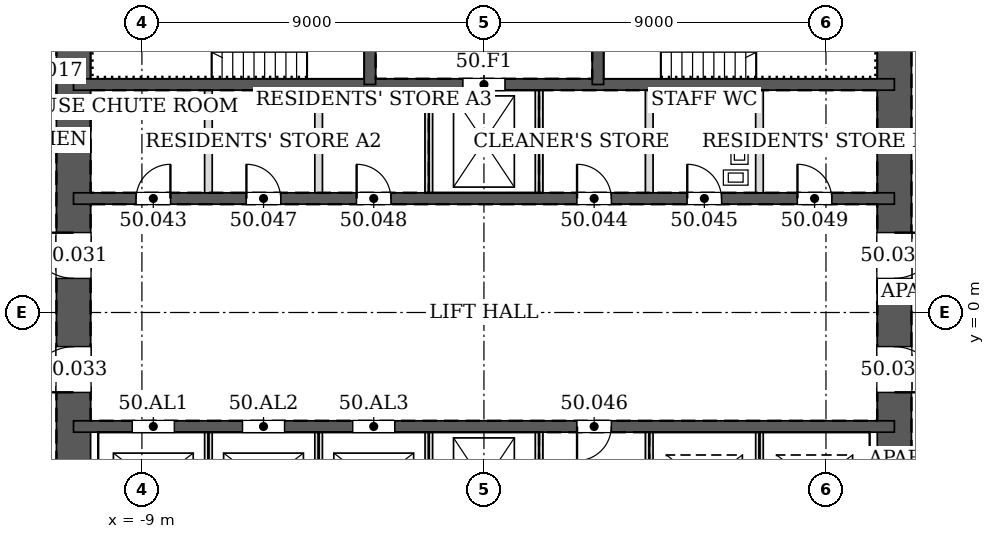
"""IFC4 building model, lengths in metres.
Left out: names, types, materials, properties, quantities, classifications, styles, units other than length and angle.
Written with IfcOpenShell. Run it as: python <this file> out.ifc"""

import sys

from ifc_helpers import new_model, si_unit, direction, frame, frame_2d, origin, place, context, subcontext, project, spatial, rectangle, extrude, element, fill, save


model = new_model("IFC4")
c1 = context("Model", 3, precision=1e-05, world=origin(), true_north=direction((0.0, 1.0)))
c2 = subcontext(c1, "Body", "Model", "MODEL_VIEW")
j1 = project(units=[si_unit("LENGTHUNIT", "METRE"), si_unit("PLANEANGLEUNIT", "RADIAN")], contexts=[c1])
p1 = place(None, origin())
s1 = spatial("IfcSite", under=j1, at=p1, CompositionType="ELEMENT")
p2 = place(p1, origin())
s2 = spatial("IfcBuilding", under=s1, at=p2, CompositionType="ELEMENT")
p3 = place(p2, frame((0.0, 0.0, 217.6)))
s3 = spatial("IfcBuildingStorey", under=s2, at=p3, CompositionType="ELEMENT", Elevation=217.6)
p4 = place(p3, frame((10.8, -10.8, 0.0), z_axis=(0.0, 0.0, 1.0), x_axis=(0.0, 1.0, 0.0)))
e1 = element("IfcWall", 1, at=p4, inside=s3, PredefinedType="SOLIDWALL", context=c2, shape_type="SweptSolid", body=[
    extrude(rectangle(XDim=21.6, YDim=0.9, at=frame_2d((10.8, 0.0))), origin(), (0.0, 0.0, 1.0), 3.4),
])
p5 = place(p4, frame((11.7, 0.0, 0.0)))
e2 = element("IfcOpeningElement", 2, at=p5, cuts=e1, PredefinedType="OPENING", context=c2, shape_type="SweptSolid", body=[
    extrude(rectangle(XDim=1.2, YDim=2.1, at=frame_2d((0.6, 1.05))), frame((0.0, 0.46, 0.0), z_axis=(0.0, -1.0, 0.0), x_axis=(1.0, 0.0, 0.0)), (0.0, 0.0, 1.0), 0.92),
])
p6 = place(p4, frame((8.7, 0.0, 0.0)))
e3 = element("IfcOpeningElement", 3, at=p6, cuts=e1, PredefinedType="OPENING", context=c2, shape_type="SweptSolid", body=[
    extrude(rectangle(XDim=1.2, YDim=2.1, at=frame_2d((0.6, 1.05))), frame((0.0, 0.46, 0.0), z_axis=(0.0, -1.0, 0.0), x_axis=(1.0, 0.0, 0.0)), (0.0, 0.0, 1.0), 0.92),
])
p7 = place(p3, frame((-10.8, 10.8, 0.0), z_axis=(0.0, 0.0, 1.0), x_axis=(0.0, -1.0, 0.0)))
e4 = element("IfcWall", 4, at=p7, inside=s3, PredefinedType="SOLIDWALL", context=c2, shape_type="SweptSolid", body=[
    extrude(rectangle(XDim=21.6, YDim=0.9, at=frame_2d((10.8, 0.0))), origin(), (0.0, 0.0, 1.0), 3.4),
])
p8 = place(p7, frame((8.7, 0.0, 0.0)))
e5 = element("IfcOpeningElement", 5, at=p8, cuts=e4, PredefinedType="OPENING", context=c2, shape_type="SweptSolid", body=[
    extrude(rectangle(XDim=1.2, YDim=2.1, at=frame_2d((0.6, 1.05))), frame((0.0, 0.46, 0.0), z_axis=(0.0, -1.0, 0.0), x_axis=(1.0, 0.0, 0.0)), (0.0, 0.0, 1.0), 0.92),
])
p9 = place(p7, frame((11.7, 0.0, 0.0)))
e6 = element("IfcOpeningElement", 6, at=p9, cuts=e4, PredefinedType="OPENING", context=c2, shape_type="SweptSolid", body=[
    extrude(rectangle(XDim=1.2, YDim=2.1, at=frame_2d((0.6, 1.05))), frame((0.0, 0.46, 0.0), z_axis=(0.0, -1.0, 0.0), x_axis=(1.0, 0.0, 0.0)), (0.0, 0.0, 1.0), 0.92),
])
p10 = place(p3, frame((-10.8, 3.0, 0.0), z_axis=(0.0, 0.0, 1.0), x_axis=(1.0, 0.0, 0.0)))
e7 = element("IfcWall", 7, at=p10, inside=s3, PredefinedType="SOLIDWALL", context=c2, shape_type="SweptSolid", body=[
    extrude(rectangle(XDim=21.6, YDim=0.3, at=frame_2d((10.8, 0.0))), origin(), (0.0, 0.0, 1.0), 3.4),
])
p11 = place(p10, frame((1.65, 0.0, 0.0)))
e8 = element("IfcOpeningElement", 8, at=p11, cuts=e7, PredefinedType="OPENING", context=c2, shape_type="SweptSolid", body=[
    extrude(rectangle(XDim=0.9, YDim=2.1, at=frame_2d((0.45, 1.05))), frame((0.0, 0.16, 0.0), z_axis=(0.0, -1.0, 0.0), x_axis=(1.0, 0.0, 0.0)), (0.0, 0.0, 1.0), 0.32),
])
p12 = place(p10, frame((13.25, 0.0, 0.0)))
e9 = element("IfcOpeningElement", 9, at=p12, cuts=e7, PredefinedType="OPENING", context=c2, shape_type="SweptSolid", body=[
    extrude(rectangle(XDim=0.9, YDim=2.1, at=frame_2d((0.45, 1.05))), frame((0.0, 0.16, 0.0), z_axis=(0.0, -1.0, 0.0), x_axis=(1.0, 0.0, 0.0)), (0.0, 0.0, 1.0), 0.32),
])
p13 = place(p10, frame((16.15, 0.0, 0.0)))
e10 = element("IfcOpeningElement", 10, at=p13, cuts=e7, PredefinedType="OPENING", context=c2, shape_type="SweptSolid", body=[
    extrude(rectangle(XDim=0.9, YDim=2.1, at=frame_2d((0.45, 1.05))), frame((0.0, 0.16, 0.0), z_axis=(0.0, -1.0, 0.0), x_axis=(1.0, 0.0, 0.0)), (0.0, 0.0, 1.0), 0.32),
])
p14 = place(p10, frame((4.55, 0.0, 0.0)))
e11 = element("IfcOpeningElement", 11, at=p14, cuts=e7, PredefinedType="OPENING", context=c2, shape_type="SweptSolid", body=[
    extrude(rectangle(XDim=0.9, YDim=2.1, at=frame_2d((0.45, 1.05))), frame((0.0, 0.16, 0.0), z_axis=(0.0, -1.0, 0.0), x_axis=(1.0, 0.0, 0.0)), (0.0, 0.0, 1.0), 0.32),
])
p15 = place(p10, frame((7.45, 0.0, 0.0)))
e12 = element("IfcOpeningElement", 12, at=p15, cuts=e7, PredefinedType="OPENING", context=c2, shape_type="SweptSolid", body=[
    extrude(rectangle(XDim=0.9, YDim=2.1, at=frame_2d((0.45, 1.05))), frame((0.0, 0.16, 0.0), z_axis=(0.0, -1.0, 0.0), x_axis=(1.0, 0.0, 0.0)), (0.0, 0.0, 1.0), 0.32),
])
p16 = place(p10, frame((19.05, 0.0, 0.0)))
e13 = element("IfcOpeningElement", 13, at=p16, cuts=e7, PredefinedType="OPENING", context=c2, shape_type="SweptSolid", body=[
    extrude(rectangle(XDim=0.9, YDim=2.1, at=frame_2d((0.45, 1.05))), frame((0.0, 0.16, 0.0), z_axis=(0.0, -1.0, 0.0), x_axis=(1.0, 0.0, 0.0)), (0.0, 0.0, 1.0), 0.32),
])
p17 = place(p3, frame((-10.8, 6.0, 0.0), z_axis=(0.0, 0.0, 1.0), x_axis=(1.0, 0.0, 0.0)))
e14 = element("IfcWall", 14, at=p17, inside=s3, PredefinedType="SOLIDWALL", context=c2, shape_type="SweptSolid", body=[
    extrude(rectangle(XDim=21.6, YDim=0.3, at=frame_2d((10.8, 0.0))), origin(), (0.0, 0.0, 1.0), 3.4),
])
p18 = place(p17, frame((10.25, 0.0, 0.0)))
e15 = element("IfcOpeningElement", 15, at=p18, cuts=e14, PredefinedType="OPENING", context=c2, shape_type="SweptSolid", body=[
    extrude(rectangle(XDim=1.1, YDim=2.1, at=frame_2d((0.55, 1.05))), frame((0.0, 0.16, 0.0), z_axis=(0.0, -1.0, 0.0), x_axis=(1.0, 0.0, 0.0)), (0.0, 0.0, 1.0), 0.32),
])
p19 = place(p3, frame((-3.0, 6.0, 0.0), z_axis=(0.0, 0.0, 1.0), x_axis=(0.0, 1.0, 0.0)))
e16 = element("IfcWall", 16, at=p19, inside=s3, PredefinedType="SOLIDWALL", context=c2, shape_type="SweptSolid", body=[
    extrude(rectangle(XDim=4.8, YDim=0.3, at=frame_2d((2.4, 0.0))), origin(), (0.0, 0.0, 1.0), 3.4),
])
p20 = place(p19, frame((1.75, 0.0, 0.0)))
e17 = element("IfcOpeningElement", 17, at=p20, cuts=e16, PredefinedType="OPENING", context=c2, shape_type="SweptSolid", body=[
    extrude(rectangle(XDim=1.0, YDim=2.1, at=frame_2d((0.5, 1.05))), frame((0.0, 0.16, 0.0), z_axis=(0.0, -1.0, 0.0), x_axis=(1.0, 0.0, 0.0)), (0.0, 0.0, 1.0), 0.32),
])
p21 = place(p3, frame((3.0, 6.0, 0.0), z_axis=(0.0, 0.0, 1.0), x_axis=(0.0, 1.0, 0.0)))
e18 = element("IfcWall", 18, at=p21, inside=s3, PredefinedType="SOLIDWALL", context=c2, shape_type="SweptSolid", body=[
    extrude(rectangle(XDim=4.8, YDim=0.3, at=frame_2d((2.4, 0.0))), origin(), (0.0, 0.0, 1.0), 3.4),
])
p22 = place(p21, frame((1.75, 0.0, 0.0)))
e19 = element("IfcOpeningElement", 19, at=p22, cuts=e18, PredefinedType="OPENING", context=c2, shape_type="SweptSolid", body=[
    extrude(rectangle(XDim=1.0, YDim=2.1, at=frame_2d((0.5, 1.05))), frame((0.0, 0.16, 0.0), z_axis=(0.0, -1.0, 0.0), x_axis=(1.0, 0.0, 0.0)), (0.0, 0.0, 1.0), 0.32),
])
p23 = place(p3, frame((-10.8, -3.0, 0.0), z_axis=(0.0, 0.0, 1.0), x_axis=(1.0, 0.0, 0.0)))
e20 = element("IfcWall", 20, at=p23, inside=s3, PredefinedType="SOLIDWALL", context=c2, shape_type="SweptSolid", body=[
    extrude(rectangle(XDim=21.6, YDim=0.3, at=frame_2d((10.8, 0.0))), origin(), (0.0, 0.0, 1.0), 3.4),
])
p24 = place(p23, frame((13.25, 0.0, 0.0)))
e21 = element("IfcOpeningElement", 21, at=p24, cuts=e20, PredefinedType="OPENING", context=c2, shape_type="SweptSolid", body=[
    extrude(rectangle(XDim=0.9, YDim=2.1, at=frame_2d((0.45, 1.05))), frame((0.0, 0.16, 0.0), z_axis=(0.0, -1.0, 0.0), x_axis=(1.0, 0.0, 0.0)), (0.0, 0.0, 1.0), 0.32),
])
p25 = place(p23, frame((1.55, 0.0, 0.0)))
e22 = element("IfcOpeningElement", 22, at=p25, cuts=e20, PredefinedType="OPENING", context=c2, shape_type="SweptSolid", body=[
    extrude(rectangle(XDim=1.1, YDim=2.1, at=frame_2d((0.55, 1.05))), frame((0.0, 0.16, 0.0), z_axis=(0.0, -1.0, 0.0), x_axis=(1.0, 0.0, 0.0)), (0.0, 0.0, 1.0), 0.32),
])
p26 = place(p23, frame((4.45, 0.0, 0.0)))
e23 = element("IfcOpeningElement", 23, at=p26, cuts=e20, PredefinedType="OPENING", context=c2, shape_type="SweptSolid", body=[
    extrude(rectangle(XDim=1.1, YDim=2.1, at=frame_2d((0.55, 1.05))), frame((0.0, 0.16, 0.0), z_axis=(0.0, -1.0, 0.0), x_axis=(1.0, 0.0, 0.0)), (0.0, 0.0, 1.0), 0.32),
])
p27 = place(p23, frame((7.35, 0.0, 0.0)))
e24 = element("IfcOpeningElement", 24, at=p27, cuts=e20, PredefinedType="OPENING", context=c2, shape_type="SweptSolid", body=[
    extrude(rectangle(XDim=1.1, YDim=2.1, at=frame_2d((0.55, 1.05))), frame((0.0, 0.16, 0.0), z_axis=(0.0, -1.0, 0.0), x_axis=(1.0, 0.0, 0.0)), (0.0, 0.0, 1.0), 0.32),
])
for number, where, z_axis, x_axis in (
    (25, (-7.25, 3.15, 0.0), (0.0, 0.0, 1.0), (0.0, 1.0, 0.0)),
    (26, (-4.35, 3.15, 0.0), (0.0, 0.0, 1.0), (0.0, 1.0, 0.0)),
    (27, (-1.45, 3.15, 0.0), (0.0, 0.0, 1.0), (0.0, 1.0, 0.0)),
    (28, (1.45, 3.15, 0.0), (0.0, 0.0, 1.0), (0.0, 1.0, 0.0)),
    (29, (4.35, 3.15, 0.0), (0.0, 0.0, 1.0), (0.0, 1.0, 0.0)),
    (30, (7.25, 3.15, 0.0), (0.0, 0.0, 1.0), (0.0, 1.0, 0.0)),
):
    element("IfcWall", number, at=place(p3, frame(where, z_axis=z_axis, x_axis=x_axis)), inside=s3, PredefinedType="PARTITIONING", context=c2, shape_type="SweptSolid", body=[
        extrude(rectangle(XDim=2.7, YDim=0.2, at=frame_2d((1.35, 0.0))), origin(), (0.0, 0.0, 1.0), 3.2),
    ])
for number, where, z_axis, x_axis in (
    (31, (-7.25, -5.85, 0.0), (0.0, 0.0, 1.0), (0.0, 1.0, 0.0)),
    (32, (-4.35, -5.85, 0.0), (0.0, 0.0, 1.0), (0.0, 1.0, 0.0)),
    (33, (-1.45, -5.85, 0.0), (0.0, 0.0, 1.0), (0.0, 1.0, 0.0)),
):
    element("IfcWall", number, at=place(p3, frame(where, z_axis=z_axis, x_axis=x_axis)), inside=s3, PredefinedType="PARTITIONING", context=c2, shape_type="SweptSolid", body=[
        extrude(rectangle(XDim=2.7, YDim=0.2, at=frame_2d((1.35, 0.0))), origin(), (0.0, 0.0, 1.0), 3.4),
    ])
for number, where, z_axis, x_axis in (
    (34, (1.45, -5.85, 0.0), (0.0, 0.0, 1.0), (0.0, 1.0, 0.0)),
    (35, (4.35, -5.85, 0.0), (0.0, 0.0, 1.0), (0.0, 1.0, 0.0)),
):
    element("IfcWall", number, at=place(p3, frame(where, z_axis=z_axis, x_axis=x_axis)), inside=s3, PredefinedType="PARTITIONING", context=c2, shape_type="SweptSolid", body=[
        extrude(rectangle(XDim=2.7, YDim=0.2, at=frame_2d((1.35, 0.0))), origin(), (0.0, 0.0, 1.0), 3.2),
    ])
p28 = place(p3, frame((7.25, -5.85, 0.0), z_axis=(0.0, 0.0, 1.0), x_axis=(0.0, 1.0, 0.0)))
e36 = element("IfcWall", 36, at=p28, inside=s3, PredefinedType="PARTITIONING", context=c2, shape_type="SweptSolid", body=[
    extrude(rectangle(XDim=2.7, YDim=0.2, at=frame_2d((1.35, 0.0))), origin(), (0.0, 0.0, 1.0), 3.4),
])
p29 = place(p5, frame((1.2, 0.0, 0.0), z_axis=(0.0, 0.0, 1.0), x_axis=(-1.0, 0.0, 0.0)))
e37 = element("IfcDoor", 37, at=p29, inside=s3, OperationType="SINGLE_SWING_LEFT", PredefinedType="DOOR", context=c2, shape_type="SweptSolid", body=[
    extrude(rectangle(XDim=1.2, YDim=2.1, at=frame_2d((0.6, 1.05))), frame((0.0, 0.025, 0.0), z_axis=(0.0, -1.0, 0.0), x_axis=(1.0, 0.0, 0.0)), (0.0, 0.0, 1.0), 0.05),
])
fill(e2, e37)
p30 = place(p8, frame((1.2, 0.0, 0.0), z_axis=(0.0, 0.0, 1.0), x_axis=(-1.0, 0.0, 0.0)))
e38 = element("IfcDoor", 38, at=p30, inside=s3, OperationType="SINGLE_SWING_RIGHT", PredefinedType="DOOR", context=c2, shape_type="SweptSolid", body=[
    extrude(rectangle(XDim=1.2, YDim=2.1, at=frame_2d((0.6, 1.05))), frame((0.0, 0.025, 0.0), z_axis=(0.0, -1.0, 0.0), x_axis=(1.0, 0.0, 0.0)), (0.0, 0.0, 1.0), 0.05),
])
fill(e5, e38)
p31 = place(p6, frame((1.2, 0.0, 0.0), z_axis=(0.0, 0.0, 1.0), x_axis=(-1.0, 0.0, 0.0)))
e39 = element("IfcDoor", 39, at=p31, inside=s3, OperationType="SINGLE_SWING_RIGHT", PredefinedType="DOOR", context=c2, shape_type="SweptSolid", body=[
    extrude(rectangle(XDim=1.2, YDim=2.1, at=frame_2d((0.6, 1.05))), frame((0.0, 0.025, 0.0), z_axis=(0.0, -1.0, 0.0), x_axis=(1.0, 0.0, 0.0)), (0.0, 0.0, 1.0), 0.05),
])
fill(e3, e39)
p32 = place(p9, frame((1.2, 0.0, 0.0), z_axis=(0.0, 0.0, 1.0), x_axis=(-1.0, 0.0, 0.0)))
e40 = element("IfcDoor", 40, at=p32, inside=s3, OperationType="SINGLE_SWING_LEFT", PredefinedType="DOOR", context=c2, shape_type="SweptSolid", body=[
    extrude(rectangle(XDim=1.2, YDim=2.1, at=frame_2d((0.6, 1.05))), frame((0.0, 0.025, 0.0), z_axis=(0.0, -1.0, 0.0), x_axis=(1.0, 0.0, 0.0)), (0.0, 0.0, 1.0), 0.05),
])
fill(e6, e40)
p33 = place(p11, origin())
e41 = element("IfcDoor", 41, at=p33, inside=s3, OperationType="SINGLE_SWING_RIGHT", PredefinedType="DOOR", context=c2, shape_type="SweptSolid", body=[
    extrude(rectangle(XDim=0.9, YDim=2.1, at=frame_2d((0.45, 1.05))), frame((0.0, 0.025, 0.0), z_axis=(0.0, -1.0, 0.0), x_axis=(1.0, 0.0, 0.0)), (0.0, 0.0, 1.0), 0.05),
])
fill(e8, e41)
p34 = place(p12, origin())
e42 = element("IfcDoor", 42, at=p34, inside=s3, OperationType="SINGLE_SWING_LEFT", PredefinedType="DOOR", context=c2, shape_type="SweptSolid", body=[
    extrude(rectangle(XDim=0.9, YDim=2.1, at=frame_2d((0.45, 1.05))), frame((0.0, 0.025, 0.0), z_axis=(0.0, -1.0, 0.0), x_axis=(1.0, 0.0, 0.0)), (0.0, 0.0, 1.0), 0.05),
])
fill(e9, e42)
p35 = place(p13, origin())
e43 = element("IfcDoor", 43, at=p35, inside=s3, OperationType="SINGLE_SWING_LEFT", PredefinedType="DOOR", context=c2, shape_type="SweptSolid", body=[
    extrude(rectangle(XDim=0.9, YDim=2.1, at=frame_2d((0.45, 1.05))), frame((0.0, 0.025, 0.0), z_axis=(0.0, -1.0, 0.0), x_axis=(1.0, 0.0, 0.0)), (0.0, 0.0, 1.0), 0.05),
])
fill(e10, e43)
p36 = place(p24, frame((0.9, 0.0, 0.0), z_axis=(0.0, 0.0, 1.0), x_axis=(-1.0, 0.0, 0.0)))
e44 = element("IfcDoor", 44, at=p36, inside=s3, OperationType="SINGLE_SWING_RIGHT", PredefinedType="DOOR", context=c2, shape_type="SweptSolid", body=[
    extrude(rectangle(XDim=0.9, YDim=2.1, at=frame_2d((0.45, 1.05))), frame((0.0, 0.025, 0.0), z_axis=(0.0, -1.0, 0.0), x_axis=(1.0, 0.0, 0.0)), (0.0, 0.0, 1.0), 0.05),
])
fill(e21, e44)
p37 = place(p14, origin())
e45 = element("IfcDoor", 45, at=p37, inside=s3, OperationType="SINGLE_SWING_LEFT", PredefinedType="DOOR", context=c2, shape_type="SweptSolid", body=[
    extrude(rectangle(XDim=0.9, YDim=2.1, at=frame_2d((0.45, 1.05))), frame((0.0, 0.025, 0.0), z_axis=(0.0, -1.0, 0.0), x_axis=(1.0, 0.0, 0.0)), (0.0, 0.0, 1.0), 0.05),
])
fill(e11, e45)
p38 = place(p15, origin())
e46 = element("IfcDoor", 46, at=p38, inside=s3, OperationType="SINGLE_SWING_LEFT", PredefinedType="DOOR", context=c2, shape_type="SweptSolid", body=[
    extrude(rectangle(XDim=0.9, YDim=2.1, at=frame_2d((0.45, 1.05))), frame((0.0, 0.025, 0.0), z_axis=(0.0, -1.0, 0.0), x_axis=(1.0, 0.0, 0.0)), (0.0, 0.0, 1.0), 0.05),
])
fill(e12, e46)
p39 = place(p16, origin())
e47 = element("IfcDoor", 47, at=p39, inside=s3, OperationType="SINGLE_SWING_LEFT", PredefinedType="DOOR", context=c2, shape_type="SweptSolid", body=[
    extrude(rectangle(XDim=0.9, YDim=2.1, at=frame_2d((0.45, 1.05))), frame((0.0, 0.025, 0.0), z_axis=(0.0, -1.0, 0.0), x_axis=(1.0, 0.0, 0.0)), (0.0, 0.0, 1.0), 0.05),
])
fill(e13, e47)
p40 = place(p18, origin())
e48 = element("IfcDoor", 48, at=p40, inside=s3, OperationType="DOUBLE_DOOR_SLIDING", PredefinedType="DOOR", context=c2, shape_type="SweptSolid", body=[
    extrude(rectangle(XDim=1.1, YDim=2.1, at=frame_2d((0.55, 1.05))), frame((0.0, 0.025, 0.0), z_axis=(0.0, -1.0, 0.0), x_axis=(1.0, 0.0, 0.0)), (0.0, 0.0, 1.0), 0.05),
])
fill(e15, e48)
p41 = place(p25, origin())
e49 = element("IfcDoor", 49, at=p41, inside=s3, OperationType="DOUBLE_DOOR_SLIDING", PredefinedType="DOOR", context=c2, shape_type="SweptSolid", body=[
    extrude(rectangle(XDim=1.1, YDim=2.1, at=frame_2d((0.55, 1.05))), frame((0.0, 0.025, 0.0), z_axis=(0.0, -1.0, 0.0), x_axis=(1.0, 0.0, 0.0)), (0.0, 0.0, 1.0), 0.05),
])
fill(e22, e49)
p42 = place(p26, origin())
e50 = element("IfcDoor", 50, at=p42, inside=s3, OperationType="DOUBLE_DOOR_SLIDING", PredefinedType="DOOR", context=c2, shape_type="SweptSolid", body=[
    extrude(rectangle(XDim=1.1, YDim=2.1, at=frame_2d((0.55, 1.05))), frame((0.0, 0.025, 0.0), z_axis=(0.0, -1.0, 0.0), x_axis=(1.0, 0.0, 0.0)), (0.0, 0.0, 1.0), 0.05),
])
fill(e23, e50)
p43 = place(p27, origin())
e51 = element("IfcDoor", 51, at=p43, inside=s3, OperationType="DOUBLE_DOOR_SLIDING", PredefinedType="DOOR", context=c2, shape_type="SweptSolid", body=[
    extrude(rectangle(XDim=1.1, YDim=2.1, at=frame_2d((0.55, 1.05))), frame((0.0, 0.025, 0.0), z_axis=(0.0, -1.0, 0.0), x_axis=(1.0, 0.0, 0.0)), (0.0, 0.0, 1.0), 0.05),
])
fill(e24, e51)
save(model, sys.argv[1])
